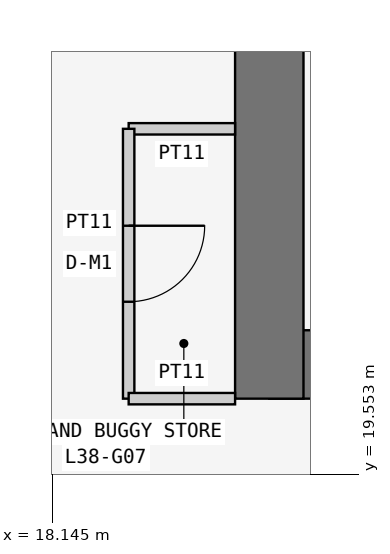
"""IFC4 building model, lengths in metres.
Left out: names, types, materials, properties, quantities, classifications, styles, units other than length and angle.
Written with IfcOpenShell. Run it as: python <this file> out.ifc"""

import sys

from ifc_helpers import new_model, si_unit, direction, frame, frame_2d, origin, place, context, subcontext, project, spatial, rectangle, extrude, element, fill, save


model = new_model("IFC4")
c1 = context("Model", 3, precision=1e-05, world=origin(), true_north=direction((0.0, 1.0)))
c2 = subcontext(c1, "Body", "Model", "MODEL_VIEW")
j1 = project(units=[si_unit("LENGTHUNIT", "METRE"), si_unit("PLANEANGLEUNIT", "RADIAN")], contexts=[c1])
p1 = place(None, origin())
s1 = spatial("IfcSite", under=j1, at=p1, CompositionType="ELEMENT")
p2 = place(p1, origin())
s2 = spatial("IfcBuilding", under=s1, at=p2, CompositionType="ELEMENT")
p3 = place(p2, frame((0.0, 0.0, 148.5)))
s3 = spatial("IfcBuildingStorey", under=s2, at=p3, CompositionType="ELEMENT", Elevation=148.5)
p4 = place(p3, frame((21.0, 21.0, 0.0), z_axis=(0.0, 0.0, 1.0), x_axis=(1.0, 0.0, 0.0)))
e1 = element("IfcWall", 1, at=p4, inside=s3, PredefinedType="SHEAR", context=c2, shape_type="SweptSolid", body=[
    extrude(rectangle(XDim=17.25, YDim=0.9, at=frame_2d((8.625, 0.0))), origin(), (0.0, 0.0, 1.0), 3.6),
])
p5 = place(p3, frame((21.0, 37.8, 0.0), z_axis=(0.0, 0.0, 1.0), x_axis=(0.0, -1.0, 0.0)))
e2 = element("IfcWall", 2, at=p5, inside=s3, PredefinedType="SHEAR", context=c2, shape_type="SweptSolid", body=[
    extrude(rectangle(XDim=17.25, YDim=0.9, at=frame_2d((8.625, 0.0))), origin(), (0.0, 0.0, 1.0), 3.6),
])
p6 = place(p5, frame((5.4, 0.0, 0.0)))
e3 = element("IfcOpeningElement", 3, at=p6, cuts=e2, PredefinedType="OPENING", context=c2, shape_type="SweptSolid", body=[
    extrude(rectangle(XDim=1.2, YDim=2.1, at=frame_2d((0.6, 1.05))), frame((0.0, 0.46, 0.0), z_axis=(0.0, -1.0, 0.0), x_axis=(1.0, 0.0, 0.0)), (0.0, 0.0, 1.0), 0.92),
])
p7 = place(p3, frame((20.55, 24.1, 0.0), z_axis=(0.0, 0.0, 1.0), x_axis=(-1.0, 0.0, 0.0)))
e4 = element("IfcWall", 4, at=p7, inside=s3, PredefinedType="PARTITIONING", context=c2, shape_type="SweptSolid", body=[
    extrude(rectangle(XDim=1.4, YDim=0.15, at=frame_2d((0.7, 0.0))), origin(), (0.0, 0.0, 1.0), 3.45),
])
p8 = place(p3, frame((19.15, 24.1, 0.0), z_axis=(0.0, 0.0, 1.0), x_axis=(0.0, -1.0, 0.0)))
e5 = element("IfcWall", 5, at=p8, inside=s3, PredefinedType="PARTITIONING", context=c2, shape_type="SweptSolid", body=[
    extrude(rectangle(XDim=3.55, YDim=0.15, at=frame_2d((1.775, 0.0))), origin(), (0.0, 0.0, 1.0), 3.45),
])
p9 = place(p8, frame((1.275, 0.0, 0.0)))
e6 = element("IfcOpeningElement", 6, at=p9, cuts=e5, PredefinedType="OPENING", context=c2, shape_type="SweptSolid", body=[
    extrude(rectangle(XDim=1.0, YDim=2.1, at=frame_2d((0.5, 1.05))), frame((0.0, 0.085, 0.0), z_axis=(0.0, -1.0, 0.0), x_axis=(1.0, 0.0, 0.0)), (0.0, 0.0, 1.0), 0.17),
])
p10 = place(p3, frame((19.15, 20.55, 0.0), z_axis=(0.0, 0.0, 1.0), x_axis=(1.0, 0.0, 0.0)))
e7 = element("IfcWall", 7, at=p10, inside=s3, PredefinedType="PARTITIONING", context=c2, shape_type="SweptSolid", body=[
    extrude(rectangle(XDim=1.4, YDim=0.15, at=frame_2d((0.7, 0.0))), origin(), (0.0, 0.0, 1.0), 3.45),
])
p11 = place(p9, origin())
e8 = element("IfcDoor", 8, at=p11, inside=s3, OperationType="SINGLE_SWING_LEFT", PredefinedType="DOOR", context=c2, shape_type="SweptSolid", body=[
    extrude(rectangle(XDim=1.0, YDim=2.1, at=frame_2d((0.5, 1.05))), frame((0.0, 0.025, 0.0), z_axis=(0.0, -1.0, 0.0), x_axis=(1.0, 0.0, 0.0)), (0.0, 0.0, 1.0), 0.05),
])
fill(e6, e8)
save(model, sys.argv[1])
